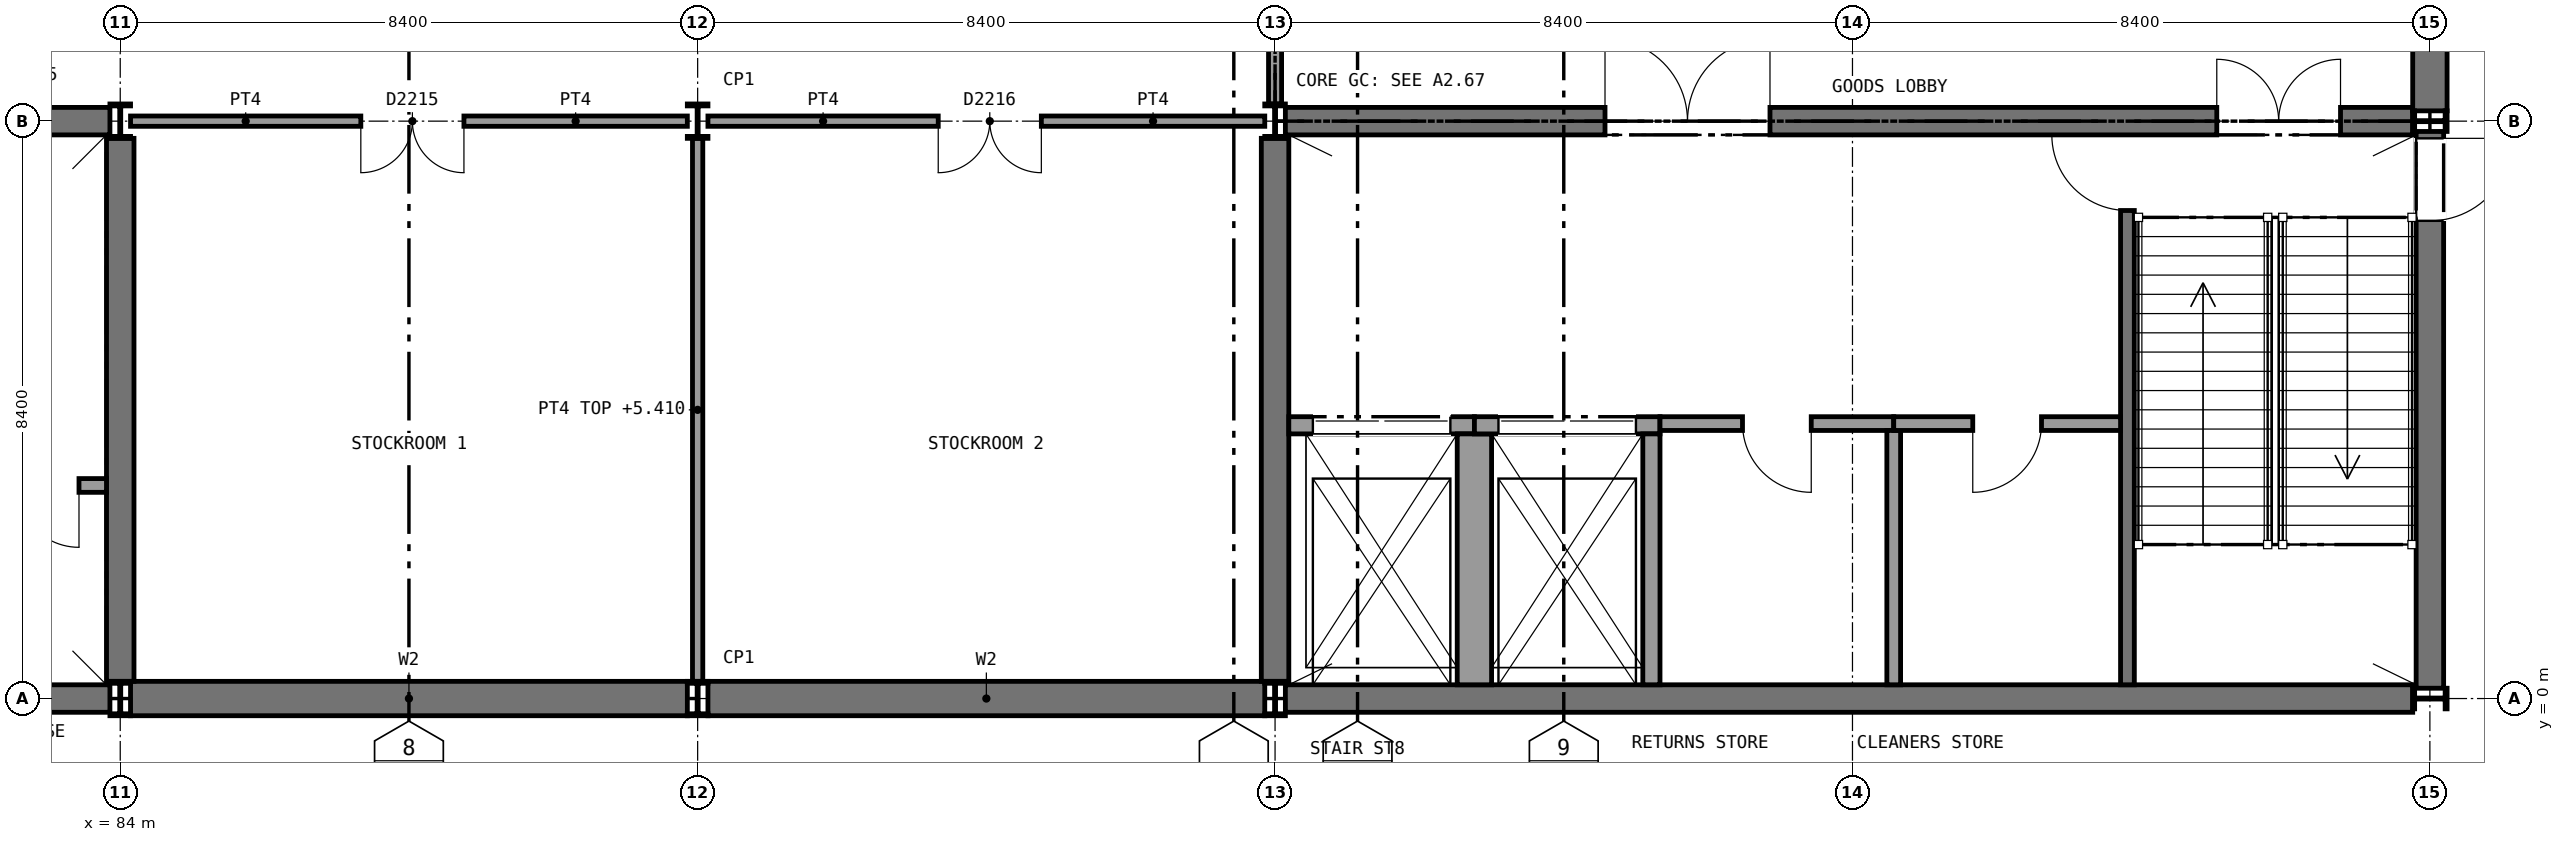
"""IFC4 building model, lengths in metres.
Left out: names, types, materials, properties, quantities, classifications, styles, units other than length and angle.
Written with IfcOpenShell. Run it as: python <this file> out.ifc"""

import sys

from ifc_helpers import new_model, si_unit, direction, frame, frame_2d, origin, origin_2d, place, context, subcontext, project, spatial, rectangle, i_section, extrude, element, fill, save


model = new_model("IFC4")
c1 = context("Model", 3, precision=1e-05, world=origin(), true_north=direction((0.0, 1.0)))
c2 = subcontext(c1, "Body", "Model", "MODEL_VIEW")
j1 = project(units=[si_unit("LENGTHUNIT", "METRE"), si_unit("PLANEANGLEUNIT", "RADIAN")], contexts=[c1])
p1 = place(None, origin())
s1 = spatial("IfcSite", under=j1, at=p1, CompositionType="ELEMENT")
p2 = place(p1, origin())
s2 = spatial("IfcBuilding", under=s1, at=p2, CompositionType="ELEMENT")
p3 = place(p2, origin())
s3 = spatial("IfcBuildingStorey", under=s2, at=p3, CompositionType="ELEMENT", Elevation=0.0)
p4 = place(p3, frame((84.15, 0.0, 0.0), z_axis=(0.0, 0.0, 1.0), x_axis=(1.0, 0.0, 0.0)))
e1 = element("IfcWall", 1, at=p4, inside=s3, PredefinedType="SHEAR", context=c2, shape_type="SweptSolid", body=[
    extrude(rectangle(XDim=8.1, YDim=0.5, at=frame_2d((4.05, 0.0))), origin(), (0.0, 0.0, 1.0), 5.85),
])
p5 = place(p3, frame((92.55, 0.0, 0.0), z_axis=(0.0, 0.0, 1.0), x_axis=(1.0, 0.0, 0.0)))
e2 = element("IfcWall", 2, at=p5, inside=s3, PredefinedType="SHEAR", context=c2, shape_type="SweptSolid", body=[
    extrude(rectangle(XDim=8.1, YDim=0.5, at=frame_2d((4.05, 0.0))), origin(), (0.0, 0.0, 1.0), 5.85),
])
p6 = place(p3, frame((75.75, 0.0, 0.0), z_axis=(0.0, 0.0, 1.0), x_axis=(1.0, 0.0, 0.0)))
e3 = element("IfcWall", 3, at=p6, inside=s3, PredefinedType="SHEAR", context=c2, shape_type="SweptSolid", body=[
    extrude(rectangle(XDim=8.1, YDim=0.4, at=frame_2d((4.05, 0.0))), origin(), (0.0, 0.0, 1.0), 5.85),
])
p7 = place(p3, frame((75.75, 8.4, 0.0), z_axis=(0.0, 0.0, 1.0), x_axis=(1.0, 0.0, 0.0)))
e4 = element("IfcWall", 4, at=p7, inside=s3, PredefinedType="SHEAR", context=c2, shape_type="SweptSolid", body=[
    extrude(rectangle(XDim=8.1, YDim=0.4, at=frame_2d((4.05, 0.0))), origin(), (0.0, 0.0, 1.0), 5.85),
])
p8 = place(p7, frame((5.3, 0.0, 0.0)))
e5 = element("IfcOpeningElement", 5, at=p8, cuts=e4, PredefinedType="OPENING", context=c2, shape_type="SweptSolid", body=[
    extrude(rectangle(XDim=1.8, YDim=2.1, at=frame_2d((0.9, 1.05))), frame((0.0, 0.21, 0.0), z_axis=(0.0, -1.0, 0.0), x_axis=(1.0, 0.0, 0.0)), (0.0, 0.0, 1.0), 0.42),
])
p9 = place(p7, frame((1.15, 0.0, 0.0)))
e6 = element("IfcOpeningElement", 6, at=p9, cuts=e4, PredefinedType="OPENING", context=c2, shape_type="SweptSolid", body=[
    extrude(rectangle(XDim=1.8, YDim=2.1, at=frame_2d((0.9, 1.05))), frame((0.0, 0.21, 0.0), z_axis=(0.0, -1.0, 0.0), x_axis=(1.0, 0.0, 0.0)), (0.0, 0.0, 1.0), 0.42),
])
p10 = place(p3, frame((84.0, 0.25, 0.0), z_axis=(0.0, 0.0, 1.0), x_axis=(0.0, 1.0, 0.0)))
e7 = element("IfcWall", 7, at=p10, inside=s3, PredefinedType="SHEAR", context=c2, shape_type="SweptSolid", body=[
    extrude(rectangle(XDim=7.9, YDim=0.4, at=frame_2d((3.95, 0.0))), origin(), (0.0, 0.0, 1.0), 5.85),
])
p11 = place(p3, frame((100.95, 0.0, 0.0), z_axis=(0.0, 0.0, 1.0), x_axis=(1.0, 0.0, 0.0)))
e8 = element("IfcWall", 8, at=p11, inside=s3, PredefinedType="SHEAR", context=c2, shape_type="SweptSolid", body=[
    extrude(rectangle(XDim=16.4, YDim=0.4, at=frame_2d((8.2, 0.0))), origin(), (0.0, 0.0, 1.0), 5.85),
])
p12 = place(p3, frame((100.95, 8.4, 0.0), z_axis=(0.0, 0.0, 1.0), x_axis=(1.0, 0.0, 0.0)))
e9 = element("IfcWall", 9, at=p12, inside=s3, PredefinedType="SHEAR", context=c2, shape_type="SweptSolid", body=[
    extrude(rectangle(XDim=16.4, YDim=0.4, at=frame_2d((8.2, 0.0))), origin(), (0.0, 0.0, 1.0), 5.85),
])
p13 = place(p12, frame((13.55, 0.0, 0.0)))
e10 = element("IfcOpeningElement", 10, at=p13, cuts=e9, PredefinedType="OPENING", context=c2, shape_type="SweptSolid", body=[
    extrude(rectangle(XDim=1.8, YDim=2.1, at=frame_2d((0.9, 1.05))), frame((0.0, 0.21, 0.0), z_axis=(0.0, -1.0, 0.0), x_axis=(1.0, 0.0, 0.0)), (0.0, 0.0, 1.0), 0.42),
])
p14 = place(p12, frame((4.65, 0.0, 0.0)))
e11 = element("IfcOpeningElement", 11, at=p14, cuts=e9, PredefinedType="OPENING", context=c2, shape_type="SweptSolid", body=[
    extrude(rectangle(XDim=2.4, YDim=2.4, at=frame_2d((1.2, 1.2))), frame((0.0, 0.21, 0.0), z_axis=(0.0, -1.0, 0.0), x_axis=(1.0, 0.0, 0.0)), (0.0, 0.0, 1.0), 0.42),
])
p15 = place(p3, frame((100.8, 0.25, 0.0), z_axis=(0.0, 0.0, 1.0), x_axis=(0.0, 1.0, 0.0)))
e12 = element("IfcWall", 12, at=p15, inside=s3, PredefinedType="SHEAR", context=c2, shape_type="SweptSolid", body=[
    extrude(rectangle(XDim=7.9, YDim=0.4, at=frame_2d((3.95, 0.0))), origin(), (0.0, 0.0, 1.0), 5.85),
])
p16 = place(p3, frame((117.6, 0.15, 0.0), z_axis=(0.0, 0.0, 1.0), x_axis=(0.0, 1.0, 0.0)))
e13 = element("IfcWall", 13, at=p16, inside=s3, PredefinedType="SHEAR", context=c2, shape_type="SweptSolid", body=[
    extrude(rectangle(XDim=8.1, YDim=0.4, at=frame_2d((4.05, 0.0))), origin(), (0.0, 0.0, 1.0), 5.85),
])
p17 = place(p16, frame((6.8, 0.0, 0.0)))
e14 = element("IfcOpeningElement", 14, at=p17, cuts=e13, PredefinedType="OPENING", context=c2, shape_type="SweptSolid", body=[
    extrude(rectangle(XDim=1.2, YDim=2.1, at=frame_2d((0.6, 1.05))), frame((0.0, 0.21, 0.0), z_axis=(0.0, -1.0, 0.0), x_axis=(1.0, 0.0, 0.0)), (0.0, 0.0, 1.0), 0.42),
])
for number, where, z_axis, x_axis in (
    (15, (84.0, 0.0, 0.0), (0.0, 0.0, 1.0), (1.0, 0.0, 0.0)),
    (16, (84.0, 8.4, 0.0), (0.0, 0.0, 1.0), (1.0, 0.0, 0.0)),
    (17, (92.4, 0.0, 0.0), (0.0, 0.0, 1.0), (1.0, 0.0, 0.0)),
    (18, (92.4, 8.4, 0.0), (0.0, 0.0, 1.0), (1.0, 0.0, 0.0)),
    (19, (100.8, 0.0, 0.0), (0.0, 0.0, 1.0), (1.0, 0.0, 0.0)),
    (20, (100.8, 8.4, 0.0), (0.0, 0.0, 1.0), (1.0, 0.0, 0.0)),
    (21, (117.6, 0.0, 0.0), (0.0, 0.0, 1.0), (0.0, 1.0, 0.0)),
    (22, (117.6, 8.4, 0.0), (0.0, 0.0, 1.0), (0.0, 1.0, 0.0)),
):
    element("IfcColumn", number, at=place(p3, frame(where, z_axis=z_axis, x_axis=x_axis)), inside=s3, PredefinedType="COLUMN", context=c2, shape_type="SweptSolid", body=[
        extrude(i_section(OverallWidth=0.3, OverallDepth=0.5, WebThickness=0.014, FlangeThickness=0.028, FilletRadius=0.027, at=origin_2d()), origin(), (0.0, 0.0, 1.0), 6.0),
    ])
p18 = place(p3, frame((92.4, 0.25, 0.0), z_axis=(0.0, 0.0, 1.0), x_axis=(0.0, 1.0, 0.0)))
e23 = element("IfcWall", 23, at=p18, inside=s3, PredefinedType="SOLIDWALL", context=c2, shape_type="SweptSolid", body=[
    extrude(rectangle(XDim=7.9, YDim=0.15, at=frame_2d((3.95, 0.0))), origin(), (0.0, 0.0, 1.0), 5.41),
])
p19 = place(p3, frame((84.15, 8.4, 0.0), z_axis=(0.0, 0.0, 1.0), x_axis=(1.0, 0.0, 0.0)))
e24 = element("IfcWall", 24, at=p19, inside=s3, PredefinedType="SOLIDWALL", context=c2, shape_type="SweptSolid", body=[
    extrude(rectangle(XDim=8.1, YDim=0.15, at=frame_2d((4.05, 0.0))), origin(), (0.0, 0.0, 1.0), 5.52),
])
p20 = place(p19, frame((3.35, 0.0, 0.0)))
e25 = element("IfcOpeningElement", 25, at=p20, cuts=e24, PredefinedType="OPENING", context=c2, shape_type="SweptSolid", body=[
    extrude(rectangle(XDim=1.5, YDim=2.1, at=frame_2d((0.75, 1.05))), frame((0.0, 0.085, 0.0), z_axis=(0.0, -1.0, 0.0), x_axis=(1.0, 0.0, 0.0)), (0.0, 0.0, 1.0), 0.17),
])
p21 = place(p3, frame((92.55, 8.4, 0.0), z_axis=(0.0, 0.0, 1.0), x_axis=(1.0, 0.0, 0.0)))
e26 = element("IfcWall", 26, at=p21, inside=s3, PredefinedType="SOLIDWALL", context=c2, shape_type="SweptSolid", body=[
    extrude(rectangle(XDim=8.1, YDim=0.15, at=frame_2d((4.05, 0.0))), origin(), (0.0, 0.0, 1.0), 5.52),
])
p22 = place(p21, frame((3.35, 0.0, 0.0)))
e27 = element("IfcOpeningElement", 27, at=p22, cuts=e26, PredefinedType="OPENING", context=c2, shape_type="SweptSolid", body=[
    extrude(rectangle(XDim=1.5, YDim=2.1, at=frame_2d((0.75, 1.05))), frame((0.0, 0.085, 0.0), z_axis=(0.0, -1.0, 0.0), x_axis=(1.0, 0.0, 0.0)), (0.0, 0.0, 1.0), 0.17),
])
p23 = place(p3, frame((100.8, 8.65, 0.0), z_axis=(0.0, 0.0, 1.0), x_axis=(0.0, 1.0, 0.0)))
e28 = element("IfcWall", 28, at=p23, inside=s3, PredefinedType="SOLIDWALL", context=c2, shape_type="SweptSolid", body=[
    extrude(rectangle(XDim=7.9, YDim=0.19, at=frame_2d((3.95, 0.0))), origin(), (0.0, 0.0, 1.0), 5.41),
])
p24 = place(p23, frame((2.85, 0.0, 0.0)))
e29 = element("IfcOpeningElement", 29, at=p24, cuts=e28, PredefinedType="OPENING", context=c2, shape_type="SweptSolid", body=[
    extrude(rectangle(XDim=2.4, YDim=2.4, at=frame_2d((1.2, 1.2))), frame((0.0, 0.105, 0.0), z_axis=(0.0, -1.0, 0.0), x_axis=(1.0, 0.0, 0.0)), (0.0, 0.0, 1.0), 0.21),
])
p25 = place(p3, frame((117.6, 8.55, 0.0), z_axis=(0.0, 0.0, 1.0), x_axis=(0.0, 1.0, 0.0)))
e30 = element("IfcWall", 30, at=p25, inside=s3, PredefinedType="STANDARD", context=c2, shape_type="SweptSolid", body=[
    extrude(rectangle(XDim=8.1, YDim=0.5, at=frame_2d((4.05, 0.0))), origin(), (0.0, 0.0, 1.0), 5.85),
])
p26 = place(p25, frame((2.25, 0.0, 0.0)))
e31 = element("IfcOpeningElement", 31, at=p26, cuts=e30, PredefinedType="OPENING", context=c2, shape_type="SweptSolid", body=[
    extrude(rectangle(XDim=3.6, YDim=4.5, at=frame_2d((1.8, 2.25))), frame((0.0, 0.26, 0.0), z_axis=(0.0, -1.0, 0.0), x_axis=(1.0, 0.0, 0.0)), (0.0, 0.0, 1.0), 0.52),
])
p27 = place(p3, frame((82.05, 3.1, 0.0), z_axis=(0.0, 0.0, 1.0), x_axis=(1.0, 0.0, 0.0)))
e32 = element("IfcWall", 32, at=p27, inside=s3, PredefinedType="PARTITIONING", context=c2, shape_type="SweptSolid", body=[
    extrude(rectangle(XDim=1.75, YDim=0.2, at=frame_2d((0.875, 0.0))), origin(), (0.0, 0.0, 1.0), 5.85),
])
p28 = place(p27, frame((0.45, 0.0, 0.0)))
e33 = element("IfcOpeningElement", 33, at=p28, cuts=e32, PredefinedType="OPENING", context=c2, shape_type="SweptSolid", body=[
    extrude(rectangle(XDim=0.9, YDim=2.1, at=frame_2d((0.45, 1.05))), frame((0.0, 0.11, 0.0), z_axis=(0.0, -1.0, 0.0), x_axis=(1.0, 0.0, 0.0)), (0.0, 0.0, 1.0), 0.22),
])
p29 = place(p3, frame((113.2, 0.2, 0.0), z_axis=(0.0, 0.0, 1.0), x_axis=(0.0, 1.0, 0.0)))
e34 = element("IfcWall", 34, at=p29, inside=s3, PredefinedType="SHEAR", context=c2, shape_type="SweptSolid", body=[
    extrude(rectangle(XDim=8.0, YDim=0.2, at=frame_2d((4.0, 0.0))), origin(), (0.0, 0.0, 1.0), 5.85),
])
p30 = place(p29, frame((6.9, 0.0, 0.0)))
e35 = element("IfcOpeningElement", 35, at=p30, cuts=e34, PredefinedType="OPENING", context=c2, shape_type="SweptSolid", body=[
    extrude(rectangle(XDim=1.11, YDim=2.1, at=frame_2d((0.555, 1.05))), frame((0.0, 0.11, 0.0), z_axis=(0.0, -1.0, 0.0), x_axis=(1.0, 0.0, 0.0)), (0.0, 0.0, 1.0), 0.22),
])
p31 = place(p3, frame((101.0, 3.975, 0.0), z_axis=(0.0, 0.0, 1.0), x_axis=(1.0, 0.0, 0.0)))
e36 = element("IfcWall", 36, at=p31, inside=s3, PredefinedType="SOLIDWALL", context=c2, shape_type="SweptSolid", body=[
    extrude(rectangle(XDim=2.7, YDim=0.25, at=frame_2d((1.35, 0.0))), origin(), (0.0, 0.0, 1.0), 6.0),
])
p32 = place(p31, frame((0.35, 0.0, 0.0)))
e37 = element("IfcOpeningElement", 37, at=p32, cuts=e36, PredefinedType="OPENING", context=c2, shape_type="SweptSolid", body=[
    extrude(rectangle(XDim=2.0, YDim=2.2, at=frame_2d((1.0, 1.1))), frame((0.0, 0.135, 0.0), z_axis=(0.0, -1.0, 0.0), x_axis=(1.0, 0.0, 0.0)), (0.0, 0.0, 1.0), 0.27),
])
p33 = place(p3, frame((103.7, 0.2, 0.0), z_axis=(0.0, 0.0, 1.0), x_axis=(0.0, 1.0, 0.0)))
e38 = element("IfcWall", 38, at=p33, inside=s3, PredefinedType="SOLIDWALL", context=c2, shape_type="SweptSolid", body=[
    extrude(rectangle(XDim=3.65, YDim=0.5, at=frame_2d((1.825, 0.0))), origin(), (0.0, 0.0, 1.0), 6.0),
])
p34 = place(p3, frame((103.7, 3.975, 0.0), z_axis=(0.0, 0.0, 1.0), x_axis=(1.0, 0.0, 0.0)))
e39 = element("IfcWall", 39, at=p34, inside=s3, PredefinedType="SOLIDWALL", context=c2, shape_type="SweptSolid", body=[
    extrude(rectangle(XDim=2.7, YDim=0.25, at=frame_2d((1.35, 0.0))), origin(), (0.0, 0.0, 1.0), 6.0),
])
p35 = place(p34, frame((0.35, 0.0, 0.0)))
e40 = element("IfcOpeningElement", 40, at=p35, cuts=e39, PredefinedType="OPENING", context=c2, shape_type="SweptSolid", body=[
    extrude(rectangle(XDim=2.0, YDim=2.2, at=frame_2d((1.0, 1.1))), frame((0.0, 0.135, 0.0), z_axis=(0.0, -1.0, 0.0), x_axis=(1.0, 0.0, 0.0)), (0.0, 0.0, 1.0), 0.27),
])
p36 = place(p3, frame((106.275, 0.2, 0.0), z_axis=(0.0, 0.0, 1.0), x_axis=(0.0, 1.0, 0.0)))
e41 = element("IfcWall", 41, at=p36, inside=s3, PredefinedType="SOLIDWALL", context=c2, shape_type="SweptSolid", body=[
    extrude(rectangle(XDim=3.65, YDim=0.25, at=frame_2d((1.825, 0.0))), origin(), (0.0, 0.0, 1.0), 6.0),
])
p37 = place(p3, frame((106.4, 4.0, 0.0), z_axis=(0.0, 0.0, 1.0), x_axis=(1.0, 0.0, 0.0)))
e42 = element("IfcWall", 42, at=p37, inside=s3, PredefinedType="PARTITIONING", context=c2, shape_type="SweptSolid", body=[
    extrude(rectangle(XDim=3.4, YDim=0.2, at=frame_2d((1.7, 0.0))), origin(), (0.0, 0.0, 1.0), 5.85),
])
p38 = place(p37, frame((1.2, 0.0, 0.0)))
e43 = element("IfcOpeningElement", 43, at=p38, cuts=e42, PredefinedType="OPENING", context=c2, shape_type="SweptSolid", body=[
    extrude(rectangle(XDim=1.0, YDim=2.1, at=frame_2d((0.5, 1.05))), frame((0.0, 0.11, 0.0), z_axis=(0.0, -1.0, 0.0), x_axis=(1.0, 0.0, 0.0)), (0.0, 0.0, 1.0), 0.22),
])
p39 = place(p3, frame((109.8, 0.2, 0.0), z_axis=(0.0, 0.0, 1.0), x_axis=(0.0, 1.0, 0.0)))
e44 = element("IfcWall", 44, at=p39, inside=s3, PredefinedType="PARTITIONING", context=c2, shape_type="SweptSolid", body=[
    extrude(rectangle(XDim=3.7, YDim=0.2, at=frame_2d((1.85, 0.0))), origin(), (0.0, 0.0, 1.0), 5.85),
])
p40 = place(p3, frame((109.8, 4.0, 0.0), z_axis=(0.0, 0.0, 1.0), x_axis=(1.0, 0.0, 0.0)))
e45 = element("IfcWall", 45, at=p40, inside=s3, PredefinedType="PARTITIONING", context=c2, shape_type="SweptSolid", body=[
    extrude(rectangle(XDim=3.3, YDim=0.2, at=frame_2d((1.65, 0.0))), origin(), (0.0, 0.0, 1.0), 5.85),
])
p41 = place(p40, frame((1.15, 0.0, 0.0)))
e46 = element("IfcOpeningElement", 46, at=p41, cuts=e45, PredefinedType="OPENING", context=c2, shape_type="SweptSolid", body=[
    extrude(rectangle(XDim=1.0, YDim=2.1, at=frame_2d((0.5, 1.05))), frame((0.0, 0.11, 0.0), z_axis=(0.0, -1.0, 0.0), x_axis=(1.0, 0.0, 0.0)), (0.0, 0.0, 1.0), 0.22),
])
p42 = place(p20, frame((1.5, 0.0, 0.0), z_axis=(0.0, 0.0, 1.0), x_axis=(-1.0, 0.0, 0.0)))
e47 = element("IfcDoor", 47, at=p42, inside=s3, OperationType="DOUBLE_DOOR_SINGLE_SWING", PredefinedType="DOOR", context=c2, shape_type="SweptSolid", body=[
    extrude(rectangle(XDim=1.5, YDim=2.1, at=frame_2d((0.75, 1.05))), frame((0.0, 0.025, 0.0), z_axis=(0.0, -1.0, 0.0), x_axis=(1.0, 0.0, 0.0)), (0.0, 0.0, 1.0), 0.05),
])
fill(e25, e47)
p43 = place(p22, frame((1.5, 0.0, 0.0), z_axis=(0.0, 0.0, 1.0), x_axis=(-1.0, 0.0, 0.0)))
e48 = element("IfcDoor", 48, at=p43, inside=s3, OperationType="DOUBLE_DOOR_SINGLE_SWING", PredefinedType="DOOR", context=c2, shape_type="SweptSolid", body=[
    extrude(rectangle(XDim=1.5, YDim=2.1, at=frame_2d((0.75, 1.05))), frame((0.0, 0.025, 0.0), z_axis=(0.0, -1.0, 0.0), x_axis=(1.0, 0.0, 0.0)), (0.0, 0.0, 1.0), 0.05),
])
fill(e27, e48)
p44 = place(p28, frame((0.9, 0.0, 0.0), z_axis=(0.0, 0.0, 1.0), x_axis=(-1.0, 0.0, 0.0)))
e49 = element("IfcDoor", 49, at=p44, inside=s3, OperationType="SINGLE_SWING_LEFT", PredefinedType="DOOR", context=c2, shape_type="SweptSolid", body=[
    extrude(rectangle(XDim=0.9, YDim=2.1, at=frame_2d((0.45, 1.05))), frame((0.0, 0.025, 0.0), z_axis=(0.0, -1.0, 0.0), x_axis=(1.0, 0.0, 0.0)), (0.0, 0.0, 1.0), 0.05),
])
fill(e33, e49)
p45 = place(p30, origin())
e50 = element("IfcDoor", 50, at=p45, inside=s3, OperationType="SINGLE_SWING_RIGHT", PredefinedType="DOOR", context=c2, shape_type="SweptSolid", body=[
    extrude(rectangle(XDim=1.1, YDim=2.1, at=frame_2d((0.55, 1.05))), frame((0.0, 0.025, 0.0), z_axis=(0.0, -1.0, 0.0), x_axis=(1.0, 0.0, 0.0)), (0.0, 0.0, 1.0), 0.05),
])
fill(e35, e50)
p46 = place(p32, origin())
e51 = element("IfcDoor", 51, at=p46, inside=s3, OperationType="DOUBLE_DOOR_SLIDING", PredefinedType="DOOR", context=c2, shape_type="SweptSolid", body=[
    extrude(rectangle(XDim=2.0, YDim=2.2, at=frame_2d((1.0, 1.1))), frame((0.0, 0.025, 0.0), z_axis=(0.0, -1.0, 0.0), x_axis=(1.0, 0.0, 0.0)), (0.0, 0.0, 1.0), 0.05),
])
fill(e37, e51)
p47 = place(p35, origin())
e52 = element("IfcDoor", 52, at=p47, inside=s3, OperationType="DOUBLE_DOOR_SLIDING", PredefinedType="DOOR", context=c2, shape_type="SweptSolid", body=[
    extrude(rectangle(XDim=2.0, YDim=2.2, at=frame_2d((1.0, 1.1))), frame((0.0, 0.025, 0.0), z_axis=(0.0, -1.0, 0.0), x_axis=(1.0, 0.0, 0.0)), (0.0, 0.0, 1.0), 0.05),
])
fill(e40, e52)
p48 = place(p38, frame((1.0, 0.0, 0.0), z_axis=(0.0, 0.0, 1.0), x_axis=(-1.0, 0.0, 0.0)))
e53 = element("IfcDoor", 53, at=p48, inside=s3, OperationType="SINGLE_SWING_LEFT", PredefinedType="DOOR", context=c2, shape_type="SweptSolid", body=[
    extrude(rectangle(XDim=1.0, YDim=2.1, at=frame_2d((0.5, 1.05))), frame((0.0, 0.025, 0.0), z_axis=(0.0, -1.0, 0.0), x_axis=(1.0, 0.0, 0.0)), (0.0, 0.0, 1.0), 0.05),
])
fill(e43, e53)
p49 = place(p41, frame((1.0, 0.0, 0.0), z_axis=(0.0, 0.0, 1.0), x_axis=(-1.0, 0.0, 0.0)))
e54 = element("IfcDoor", 54, at=p49, inside=s3, OperationType="SINGLE_SWING_RIGHT", PredefinedType="DOOR", context=c2, shape_type="SweptSolid", body=[
    extrude(rectangle(XDim=1.0, YDim=2.1, at=frame_2d((0.5, 1.05))), frame((0.0, 0.025, 0.0), z_axis=(0.0, -1.0, 0.0), x_axis=(1.0, 0.0, 0.0)), (0.0, 0.0, 1.0), 0.05),
])
fill(e46, e54)
p50 = place(p13, origin())
e55 = element("IfcDoor", 55, at=p50, inside=s3, OperationType="DOUBLE_DOOR_SINGLE_SWING", PredefinedType="DOOR", context=c2, shape_type="SweptSolid", body=[
    extrude(rectangle(XDim=1.8, YDim=2.1, at=frame_2d((0.9, 1.05))), frame((0.0, 0.025, 0.0), z_axis=(0.0, -1.0, 0.0), x_axis=(1.0, 0.0, 0.0)), (0.0, 0.0, 1.0), 0.05),
])
fill(e10, e55)
p51 = place(p14, origin())
e56 = element("IfcDoor", 56, at=p51, inside=s3, OperationType="DOUBLE_DOOR_SINGLE_SWING", PredefinedType="DOOR", context=c2, shape_type="SweptSolid", body=[
    extrude(rectangle(XDim=2.4, YDim=2.4, at=frame_2d((1.2, 1.2))), frame((0.0, 0.025, 0.0), z_axis=(0.0, -1.0, 0.0), x_axis=(1.0, 0.0, 0.0)), (0.0, 0.0, 1.0), 0.05),
])
fill(e11, e56)
p52 = place(p17, frame((1.2, 0.0, 0.0), z_axis=(0.0, 0.0, 1.0), x_axis=(-1.0, 0.0, 0.0)))
e57 = element("IfcDoor", 57, at=p52, inside=s3, OperationType="SINGLE_SWING_LEFT", PredefinedType="DOOR", context=c2, shape_type="SweptSolid", body=[
    extrude(rectangle(XDim=1.2, YDim=2.1, at=frame_2d((0.6, 1.05))), frame((0.0, 0.025, 0.0), z_axis=(0.0, -1.0, 0.0), x_axis=(1.0, 0.0, 0.0)), (0.0, 0.0, 1.0), 0.05),
])
fill(e14, e57)
save(model, sys.argv[1])
